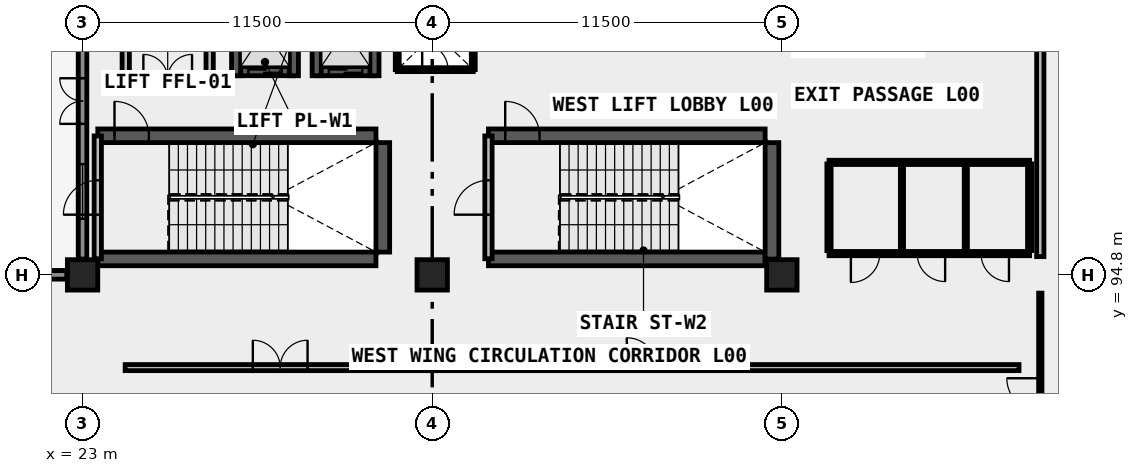
"""IFC4 building model, lengths in metres.
Left out: names, types, materials, properties, quantities, classifications, styles, units other than length and angle.
Written with IfcOpenShell. Run it as: python <this file> out.ifc"""

import sys

from ifc_helpers import new_model, si_unit, direction, frame, frame_2d, origin, origin_2d, place, context, subcontext, project, spatial, rectangle, extrude, element, fill, save


model = new_model("IFC4")
c1 = context("Model", 3, precision=1e-05, world=origin(), true_north=direction((0.0, 1.0)))
c2 = subcontext(c1, "Body", "Model", "MODEL_VIEW")
j1 = project(units=[si_unit("LENGTHUNIT", "METRE"), si_unit("PLANEANGLEUNIT", "RADIAN")], contexts=[c1])
p1 = place(None, origin())
s1 = spatial("IfcSite", under=j1, at=p1, CompositionType="ELEMENT")
p2 = place(p1, origin())
s2 = spatial("IfcBuilding", under=s1, at=p2, CompositionType="ELEMENT")
p3 = place(p2, origin())
s3 = spatial("IfcBuildingStorey", under=s2, at=p3, CompositionType="ELEMENT", Elevation=0.0)
for number, where, z_axis, x_axis in (
    (1, (23.0, 94.8, 0.0), (0.0, 0.0, 1.0), (1.0, 0.0, 0.0)),
    (2, (34.5, 94.8, 0.0), (0.0, 0.0, 1.0), (1.0, 0.0, 0.0)),
    (3, (46.0, 94.8, 0.0), (0.0, 0.0, 1.0), (1.0, 0.0, 0.0)),
):
    element("IfcColumn", number, at=place(p3, frame(where, z_axis=z_axis, x_axis=x_axis)), inside=s3, PredefinedType="COLUMN", context=c2, shape_type="SweptSolid", body=[
        extrude(rectangle(XDim=1.0, YDim=1.0, at=origin_2d()), origin(), (0.0, 0.0, 1.0), 4.2),
    ])
p4 = place(p3, frame((28.05, 101.5, 0.0), z_axis=(0.0, 0.0, 1.0), x_axis=(1.0, 0.0, 0.0)))
e4 = element("IfcWall", 4, at=p4, inside=s3, PredefinedType="SHEAR", context=c2, shape_type="SweptSolid", body=[
    extrude(rectangle(XDim=1.9, YDim=0.3, at=frame_2d((0.95, 0.0))), origin(), (0.0, 0.0, 1.0), 4.2),
])
p5 = place(p4, frame((0.4, 0.0, 0.0)))
e5 = element("IfcOpeningElement", 5, at=p5, cuts=e4, PredefinedType="OPENING", context=c2, shape_type="SweptSolid", body=[
    extrude(rectangle(XDim=1.1, YDim=2.15, at=frame_2d((0.55, 1.075))), frame((0.0, 0.16, 0.0), z_axis=(0.0, -1.0, 0.0), x_axis=(1.0, 0.0, 0.0)), (0.0, 0.0, 1.0), 0.32),
])
for number, where, z_axis, x_axis in (
    (6, (28.05, 101.35, 0.0), (0.0, 0.0, 1.0), (0.0, 1.0, 0.0)),
    (7, (29.95, 101.35, 0.0), (0.0, 0.0, 1.0), (0.0, 1.0, 0.0)),
):
    element("IfcWall", number, at=place(p3, frame(where, z_axis=z_axis, x_axis=x_axis)), inside=s3, PredefinedType="SHEAR", context=c2, shape_type="SweptSolid", body=[
        extrude(rectangle(XDim=3.0, YDim=0.3, at=frame_2d((1.5, 0.0))), origin(), (0.0, 0.0, 1.0), 4.2),
    ])
p6 = place(p3, frame((30.7, 101.5, 0.0), z_axis=(0.0, 0.0, 1.0), x_axis=(1.0, 0.0, 0.0)))
e8 = element("IfcWall", 8, at=p6, inside=s3, PredefinedType="SHEAR", context=c2, shape_type="SweptSolid", body=[
    extrude(rectangle(XDim=1.9, YDim=0.3, at=frame_2d((0.95, 0.0))), origin(), (0.0, 0.0, 1.0), 4.2),
])
p7 = place(p6, frame((0.4, 0.0, 0.0)))
e9 = element("IfcOpeningElement", 9, at=p7, cuts=e8, PredefinedType="OPENING", context=c2, shape_type="SweptSolid", body=[
    extrude(rectangle(XDim=1.1, YDim=2.15, at=frame_2d((0.55, 1.075))), frame((0.0, 0.16, 0.0), z_axis=(0.0, -1.0, 0.0), x_axis=(1.0, 0.0, 0.0)), (0.0, 0.0, 1.0), 0.32),
])
for number, where, z_axis, x_axis in (
    (10, (30.7, 101.35, 0.0), (0.0, 0.0, 1.0), (0.0, 1.0, 0.0)),
    (11, (32.6, 101.35, 0.0), (0.0, 0.0, 1.0), (0.0, 1.0, 0.0)),
):
    element("IfcWall", number, at=place(p3, frame(where, z_axis=z_axis, x_axis=x_axis)), inside=s3, PredefinedType="SHEAR", context=c2, shape_type="SweptSolid", body=[
        extrude(rectangle(XDim=3.0, YDim=0.3, at=frame_2d((1.5, 0.0))), origin(), (0.0, 0.0, 1.0), 4.2),
    ])
p8 = place(p3, frame((23.5, 95.325, 0.0), z_axis=(0.0, 0.0, 1.0), x_axis=(1.0, 0.0, 0.0)))
e12 = element("IfcWall", 12, at=p8, inside=s3, PredefinedType="SHEAR", context=c2, shape_type="SweptSolid", body=[
    extrude(rectangle(XDim=9.15, YDim=0.45, at=frame_2d((4.575, 0.0))), origin(), (0.0, 0.0, 1.0), 4.2),
])
p9 = place(p3, frame((23.5, 99.375, 0.0), z_axis=(0.0, 0.0, 1.0), x_axis=(1.0, 0.0, 0.0)))
e13 = element("IfcWall", 13, at=p9, inside=s3, PredefinedType="SHEAR", context=c2, shape_type="SweptSolid", body=[
    extrude(rectangle(XDim=9.15, YDim=0.45, at=frame_2d((4.575, 0.0))), origin(), (0.0, 0.0, 1.0), 4.2),
])
p10 = place(p9, frame((0.55, 0.0, 0.0)))
e14 = element("IfcOpeningElement", 14, at=p10, cuts=e13, PredefinedType="OPENING", context=c2, shape_type="SweptSolid", body=[
    extrude(rectangle(XDim=1.13, YDim=2.15, at=frame_2d((0.565, 1.075))), frame((0.0, 0.235, 0.0), z_axis=(0.0, -1.0, 0.0), x_axis=(1.0, 0.0, 0.0)), (0.0, 0.0, 1.0), 0.47),
])
p11 = place(p3, frame((32.875, 95.55, 0.0), z_axis=(0.0, 0.0, 1.0), x_axis=(0.0, 1.0, 0.0)))
e15 = element("IfcWall", 15, at=p11, inside=s3, PredefinedType="SHEAR", context=c2, shape_type="SweptSolid", body=[
    extrude(rectangle(XDim=3.6, YDim=0.45, at=frame_2d((1.8, 0.0))), origin(), (0.0, 0.0, 1.0), 4.2),
])
p12 = place(p3, frame((36.35, 95.325, 0.0), z_axis=(0.0, 0.0, 1.0), x_axis=(1.0, 0.0, 0.0)))
e16 = element("IfcWall", 16, at=p12, inside=s3, PredefinedType="SHEAR", context=c2, shape_type="SweptSolid", body=[
    extrude(rectangle(XDim=9.1, YDim=0.45, at=frame_2d((4.55, 0.0))), origin(), (0.0, 0.0, 1.0), 4.2),
])
p13 = place(p3, frame((36.35, 99.375, 0.0), z_axis=(0.0, 0.0, 1.0), x_axis=(1.0, 0.0, 0.0)))
e17 = element("IfcWall", 17, at=p13, inside=s3, PredefinedType="SHEAR", context=c2, shape_type="SweptSolid", body=[
    extrude(rectangle(XDim=9.1, YDim=0.45, at=frame_2d((4.55, 0.0))), origin(), (0.0, 0.0, 1.0), 4.2),
])
p14 = place(p13, frame((0.55, 0.0, 0.0)))
e18 = element("IfcOpeningElement", 18, at=p14, cuts=e17, PredefinedType="OPENING", context=c2, shape_type="SweptSolid", body=[
    extrude(rectangle(XDim=1.13, YDim=2.15, at=frame_2d((0.565, 1.075))), frame((0.0, 0.235, 0.0), z_axis=(0.0, -1.0, 0.0), x_axis=(1.0, 0.0, 0.0)), (0.0, 0.0, 1.0), 0.47),
])
p15 = place(p3, frame((45.675, 95.32, 0.0), z_axis=(0.0, 0.0, 1.0), x_axis=(0.0, 1.0, 0.0)))
e19 = element("IfcWall", 19, at=p15, inside=s3, PredefinedType="SHEAR", context=c2, shape_type="SweptSolid", body=[
    extrude(rectangle(XDim=3.83, YDim=0.45, at=frame_2d((1.915, 0.0))), origin(), (0.0, 0.0, 1.0), 4.2),
])
p16 = place(p3, frame((23.0, 95.32, 0.0), z_axis=(0.0, 0.0, 1.0), x_axis=(0.0, 1.0, 0.0)))
e20 = element("IfcWall", 20, at=p16, inside=s3, PredefinedType="SOLIDWALL", context=c2, shape_type="SweptSolid", body=[
    extrude(rectangle(XDim=8.96, YDim=0.28, at=frame_2d((4.48, 0.0))), origin(), (0.0, 0.0, 1.0), 3.15),
])
p17 = place(p16, frame((4.447, 0.0, 0.0)))
e21 = element("IfcOpeningElement", 21, at=p17, cuts=e20, PredefinedType="OPENING", context=c2, shape_type="SweptSolid", body=[
    extrude(rectangle(XDim=1.5, YDim=2.3, at=frame_2d((0.75, 1.15))), frame((0.0, 0.15, 0.0), z_axis=(0.0, -1.0, 0.0), x_axis=(1.0, 0.0, 0.0)), (0.0, 0.0, 1.0), 0.3),
])
p18 = place(p16, frame((1.323, 0.0, 0.78)))
e22 = element("IfcOpeningElement", 22, at=p18, cuts=e20, PredefinedType="OPENING", context=c2, shape_type="SweptSolid", body=[
    extrude(rectangle(XDim=1.8, YDim=1.95, at=frame_2d((0.9, 0.975))), frame((0.0, 0.15, 0.0), z_axis=(0.0, -1.0, 0.0), x_axis=(1.0, 0.0, 0.0)), (0.0, 0.0, 1.0), 0.3),
])
p19 = place(p3, frame((12.02, 94.8, 0.0), z_axis=(0.0, 0.0, 1.0), x_axis=(1.0, 0.0, 0.0)))
e23 = element("IfcWall", 23, at=p19, inside=s3, PredefinedType="SOLIDWALL", context=c2, shape_type="SweptSolid", body=[
    extrude(rectangle(XDim=10.46, YDim=0.28, at=frame_2d((5.23, 0.0))), origin(), (0.0, 0.0, 1.0), 3.15),
])
p20 = place(p19, frame((4.28, 0.0, 0.0)))
e24 = element("IfcOpeningElement", 24, at=p20, cuts=e23, PredefinedType="OPENING", context=c2, shape_type="SweptSolid", body=[
    extrude(rectangle(XDim=1.9, YDim=2.2, at=frame_2d((0.95, 1.1))), frame((0.0, 0.15, 0.0), z_axis=(0.0, -1.0, 0.0), x_axis=(1.0, 0.0, 0.0)), (0.0, 0.0, 1.0), 0.3),
])
p21 = place(p19, frame((1.24, 0.0, 0.78)))
e25 = element("IfcOpeningElement", 25, at=p21, cuts=e23, PredefinedType="OPENING", context=c2, shape_type="SweptSolid", body=[
    extrude(rectangle(XDim=1.8, YDim=1.95, at=frame_2d((0.9, 0.975))), frame((0.0, 0.15, 0.0), z_axis=(0.0, -1.0, 0.0), x_axis=(1.0, 0.0, 0.0)), (0.0, 0.0, 1.0), 0.3),
])
p22 = place(p3, frame((23.5, 95.33, 0.0), z_axis=(0.0, 0.0, 1.0), x_axis=(0.0, 1.0, 0.0)))
e26 = element("IfcWall", 26, at=p22, inside=s3, PredefinedType="SOLIDWALL", context=c2, shape_type="SweptSolid", body=[
    extrude(rectangle(XDim=4.04, YDim=0.24, at=frame_2d((2.02, 0.0))), origin(), (0.0, 0.0, 1.0), 3.88),
])
p23 = place(p22, frame((1.45, 0.0, 0.0)))
e27 = element("IfcOpeningElement", 27, at=p23, cuts=e26, PredefinedType="OPENING", context=c2, shape_type="SweptSolid", body=[
    extrude(rectangle(XDim=1.13, YDim=2.15, at=frame_2d((0.565, 1.075))), frame((0.0, 0.13, 0.0), z_axis=(0.0, -1.0, 0.0), x_axis=(1.0, 0.0, 0.0)), (0.0, 0.0, 1.0), 0.26),
])
p24 = place(p3, frame((36.35, 95.33, 0.0), z_axis=(0.0, 0.0, 1.0), x_axis=(0.0, 1.0, 0.0)))
e28 = element("IfcWall", 28, at=p24, inside=s3, PredefinedType="SOLIDWALL", context=c2, shape_type="SweptSolid", body=[
    extrude(rectangle(XDim=4.04, YDim=0.24, at=frame_2d((2.02, 0.0))), origin(), (0.0, 0.0, 1.0), 3.88),
])
p25 = place(p24, frame((1.45, 0.0, 0.0)))
e29 = element("IfcOpeningElement", 29, at=p25, cuts=e28, PredefinedType="OPENING", context=c2, shape_type="SweptSolid", body=[
    extrude(rectangle(XDim=1.13, YDim=2.15, at=frame_2d((0.565, 1.075))), frame((0.0, 0.13, 0.0), z_axis=(0.0, -1.0, 0.0), x_axis=(1.0, 0.0, 0.0)), (0.0, 0.0, 1.0), 0.26),
])
p26 = place(p3, frame((24.42, 101.25, 0.0), z_axis=(0.0, 0.0, 1.0), x_axis=(1.0, 0.0, 0.0)))
e30 = element("IfcWall", 30, at=p26, inside=s3, PredefinedType="SOLIDWALL", context=c2, shape_type="SweptSolid", body=[
    extrude(rectangle(XDim=2.76, YDim=0.24, at=frame_2d((1.38, 0.0))), origin(), (0.0, 0.0, 1.0), 3.88),
])
p27 = place(p26, frame((0.58, 0.0, 0.0)))
e31 = element("IfcOpeningElement", 31, at=p27, cuts=e30, PredefinedType="OPENING", context=c2, shape_type="SweptSolid", body=[
    extrude(rectangle(XDim=1.6, YDim=2.15, at=frame_2d((0.8, 1.075))), frame((0.0, 0.13, 0.0), z_axis=(0.0, -1.0, 0.0), x_axis=(1.0, 0.0, 0.0)), (0.0, 0.0, 1.0), 0.26),
])
for number, where, z_axis, x_axis in (
    (32, (24.42, 101.25, 0.0), (0.0, 0.0, 1.0), (0.0, 1.0, 0.0)),
    (33, (27.18, 101.25, 0.0), (0.0, 0.0, 1.0), (0.0, 1.0, 0.0)),
):
    element("IfcWall", number, at=place(p3, frame(where, z_axis=z_axis, x_axis=x_axis)), inside=s3, PredefinedType="SOLIDWALL", context=c2, shape_type="SweptSolid", body=[
        extrude(rectangle(XDim=2.6, YDim=0.24, at=frame_2d((1.3, 0.0))), origin(), (0.0, 0.0, 1.0), 3.88),
    ])
p28 = place(p3, frame((33.35, 101.55, 0.0), z_axis=(0.0, 0.0, 1.0), x_axis=(1.0, 0.0, 0.0)))
e34 = element("IfcWall", 34, at=p28, inside=s3, PredefinedType="PLUMBINGWALL", context=c2, shape_type="SweptSolid", body=[
    extrude(rectangle(XDim=2.5, YDim=0.13, at=frame_2d((1.25, 0.0))), origin(), (0.0, 0.0, 1.0), 3.88),
])
p29 = place(p28, frame((0.82, 0.0, 0.0)))
e35 = element("IfcOpeningElement", 35, at=p29, cuts=e34, PredefinedType="OPENING", context=c2, shape_type="SweptSolid", body=[
    extrude(rectangle(XDim=0.85, YDim=2.0, at=frame_2d((0.425, 1.0))), frame((0.0, 0.075, 0.0), z_axis=(0.0, -1.0, 0.0), x_axis=(1.0, 0.0, 0.0)), (0.0, 0.0, 1.0), 0.15),
])
for number, where, z_axis, x_axis in (
    (36, (33.35, 101.55, 0.0), (0.0, 0.0, 1.0), (0.0, 1.0, 0.0)),
    (37, (35.85, 101.55, 0.0), (0.0, 0.0, 1.0), (0.0, 1.0, 0.0)),
):
    element("IfcWall", number, at=place(p3, frame(where, z_axis=z_axis, x_axis=x_axis)), inside=s3, PredefinedType="PLUMBINGWALL", context=c2, shape_type="SweptSolid", body=[
        extrude(rectangle(XDim=2.4, YDim=0.13, at=frame_2d((1.2, 0.0))), origin(), (0.0, 0.0, 1.0), 3.88),
    ])
p30 = place(p3, frame((47.55, 95.5, 0.0), z_axis=(0.0, 0.0, 1.0), x_axis=(1.0, 0.0, 0.0)))
e38 = element("IfcWall", 38, at=p30, inside=s3, PredefinedType="PLUMBINGWALL", context=c2, shape_type="SweptSolid", body=[
    extrude(rectangle(XDim=6.6, YDim=0.14, at=frame_2d((3.3, 0.0))), origin(), (0.0, 0.0, 1.0), 3.88),
])
p31 = place(p30, frame((0.72, 0.0, 0.0)))
e39 = element("IfcOpeningElement", 39, at=p31, cuts=e38, PredefinedType="OPENING", context=c2, shape_type="SweptSolid", body=[
    extrude(rectangle(XDim=0.95, YDim=2.1, at=frame_2d((0.475, 1.05))), frame((0.0, 0.08, 0.0), z_axis=(0.0, -1.0, 0.0), x_axis=(1.0, 0.0, 0.0)), (0.0, 0.0, 1.0), 0.16),
])
p32 = place(p30, frame((2.9, 0.0, 0.0)))
e40 = element("IfcOpeningElement", 40, at=p32, cuts=e38, PredefinedType="OPENING", context=c2, shape_type="SweptSolid", body=[
    extrude(rectangle(XDim=0.92, YDim=2.1, at=frame_2d((0.46, 1.05))), frame((0.0, 0.08, 0.0), z_axis=(0.0, -1.0, 0.0), x_axis=(1.0, 0.0, 0.0)), (0.0, 0.0, 1.0), 0.16),
])
p33 = place(p30, frame((5.0, 0.0, 0.0)))
e41 = element("IfcOpeningElement", 41, at=p33, cuts=e38, PredefinedType="OPENING", context=c2, shape_type="SweptSolid", body=[
    extrude(rectangle(XDim=0.92, YDim=2.1, at=frame_2d((0.46, 1.05))), frame((0.0, 0.08, 0.0), z_axis=(0.0, -1.0, 0.0), x_axis=(1.0, 0.0, 0.0)), (0.0, 0.0, 1.0), 0.16),
])
p34 = place(p3, frame((47.55, 95.6, 0.0), z_axis=(0.0, 0.0, 1.0), x_axis=(0.0, 1.0, 0.0)))
e42 = element("IfcWall", 42, at=p34, inside=s3, PredefinedType="PLUMBINGWALL", context=c2, shape_type="SweptSolid", body=[
    extrude(rectangle(XDim=2.85, YDim=0.14, at=frame_2d((1.425, 0.0))), origin(), (0.0, 0.0, 1.0), 3.88),
])
p35 = place(p3, frame((49.95, 95.6, 0.0), z_axis=(0.0, 0.0, 1.0), x_axis=(0.0, 1.0, 0.0)))
e43 = element("IfcWall", 43, at=p35, inside=s3, PredefinedType="PARTITIONING", context=c2, shape_type="SweptSolid", body=[
    extrude(rectangle(XDim=2.85, YDim=0.105, at=frame_2d((1.425, 0.0))), origin(), (0.0, 0.0, 1.0), 3.4),
])
p36 = place(p3, frame((52.05, 95.6, 0.0), z_axis=(0.0, 0.0, 1.0), x_axis=(0.0, 1.0, 0.0)))
e44 = element("IfcWall", 44, at=p36, inside=s3, PredefinedType="PARTITIONING", context=c2, shape_type="SweptSolid", body=[
    extrude(rectangle(XDim=2.85, YDim=0.105, at=frame_2d((1.425, 0.0))), origin(), (0.0, 0.0, 1.0), 3.88),
])
p37 = place(p3, frame((54.15, 95.6, 0.0), z_axis=(0.0, 0.0, 1.0), x_axis=(0.0, 1.0, 0.0)))
e45 = element("IfcWall", 45, at=p37, inside=s3, PredefinedType="PLUMBINGWALL", context=c2, shape_type="SweptSolid", body=[
    extrude(rectangle(XDim=2.85, YDim=0.14, at=frame_2d((1.425, 0.0))), origin(), (0.0, 0.0, 1.0), 3.88),
])
p38 = place(p3, frame((47.55, 98.5, 0.0), z_axis=(0.0, 0.0, 1.0), x_axis=(1.0, 0.0, 0.0)))
e46 = element("IfcWall", 46, at=p38, inside=s3, PredefinedType="PLUMBINGWALL", context=c2, shape_type="SweptSolid", body=[
    extrude(rectangle(XDim=6.6, YDim=0.14, at=frame_2d((3.3, 0.0))), origin(), (0.0, 0.0, 1.0), 3.88),
])
p39 = place(p3, frame((24.4, 91.75, 0.0), z_axis=(0.0, 0.0, 1.0), x_axis=(1.0, 0.0, 0.0)))
e47 = element("IfcWall", 47, at=p39, inside=s3, PredefinedType="PARTITIONING", context=c2, shape_type="SweptSolid", body=[
    extrude(rectangle(XDim=29.4, YDim=0.2, at=frame_2d((14.7, 0.0))), origin(), (0.0, 0.0, 1.0), 3.88),
])
p40 = place(p39, frame((4.2, 0.0, 0.0)))
e48 = element("IfcOpeningElement", 48, at=p40, cuts=e47, PredefinedType="OPENING", context=c2, shape_type="SweptSolid", body=[
    extrude(rectangle(XDim=1.8, YDim=2.2, at=frame_2d((0.9, 1.1))), frame((0.0, 0.11, 0.0), z_axis=(0.0, -1.0, 0.0), x_axis=(1.0, 0.0, 0.0)), (0.0, 0.0, 1.0), 0.22),
])
p41 = place(p39, frame((16.5, 0.0, 0.0)))
e49 = element("IfcOpeningElement", 49, at=p41, cuts=e47, PredefinedType="OPENING", context=c2, shape_type="SweptSolid", body=[
    extrude(rectangle(XDim=0.98, YDim=2.15, at=frame_2d((0.49, 1.075))), frame((0.0, 0.11, 0.0), z_axis=(0.0, -1.0, 0.0), x_axis=(1.0, 0.0, 0.0)), (0.0, 0.0, 1.0), 0.22),
])
p42 = place(p3, frame((54.5, 86.4, 0.0), z_axis=(0.0, 0.0, 1.0), x_axis=(0.0, 1.0, 0.0)))
e50 = element("IfcWall", 50, at=p42, inside=s3, PredefinedType="MOVABLE", context=c2, shape_type="SweptSolid", body=[
    extrude(rectangle(XDim=7.8, YDim=0.11, at=frame_2d((3.9, 0.0))), origin(), (0.0, 0.0, 1.0), 3.88),
])
p43 = place(p42, frame((2.8, 0.0, 0.0)))
e51 = element("IfcOpeningElement", 51, at=p43, cuts=e50, PredefinedType="OPENING", context=c2, shape_type="SweptSolid", body=[
    extrude(rectangle(XDim=2.2, YDim=2.4, at=frame_2d((1.1, 1.2))), frame((0.0, 0.065, 0.0), z_axis=(0.0, -1.0, 0.0), x_axis=(1.0, 0.0, 0.0)), (0.0, 0.0, 1.0), 0.13),
])
p44 = place(p3, frame((54.5, 95.4, 0.0), z_axis=(0.0, 0.0, 1.0), x_axis=(0.0, 1.0, 0.0)))
e52 = element("IfcWall", 52, at=p44, inside=s3, PredefinedType="SOLIDWALL", context=c2, shape_type="SweptSolid", body=[
    extrude(rectangle(XDim=9.12, YDim=0.24, at=frame_2d((4.56, 0.0))), origin(), (0.0, 0.0, 1.0), 3.88),
])
p45 = place(p17, origin())
e53 = element("IfcDoor", 53, at=p45, inside=s3, OperationType="DOUBLE_DOOR_SINGLE_SWING", PredefinedType="DOOR", context=c2, shape_type="SweptSolid", body=[
    extrude(rectangle(XDim=1.5, YDim=2.3, at=frame_2d((0.75, 1.15))), frame((0.0, 0.025, 0.0), z_axis=(0.0, -1.0, 0.0), x_axis=(1.0, 0.0, 0.0)), (0.0, 0.0, 1.0), 0.05),
])
fill(e21, e53)
p46 = place(p18, origin())
e54 = element("IfcWindow", 54, at=p46, inside=s3, PartitioningType="SINGLE_PANEL", PredefinedType="WINDOW", context=c2, shape_type="SweptSolid", body=[
    extrude(rectangle(XDim=1.8, YDim=1.95, at=frame_2d((0.9, 0.975))), frame((0.0, 0.03, 0.0), z_axis=(0.0, -1.0, 0.0), x_axis=(1.0, 0.0, 0.0)), (0.0, 0.0, 1.0), 0.06),
])
fill(e22, e54)
p47 = place(p5, origin())
e55 = element("IfcDoor", 55, at=p47, inside=s3, OperationType="SLIDING_TO_LEFT", PredefinedType="DOOR", context=c2, shape_type="SweptSolid", body=[
    extrude(rectangle(XDim=1.1, YDim=2.15, at=frame_2d((0.55, 1.075))), frame((0.0, 0.025, 0.0), z_axis=(0.0, -1.0, 0.0), x_axis=(1.0, 0.0, 0.0)), (0.0, 0.0, 1.0), 0.05),
])
fill(e5, e55)
p48 = place(p7, origin())
e56 = element("IfcDoor", 56, at=p48, inside=s3, OperationType="SLIDING_TO_LEFT", PredefinedType="DOOR", context=c2, shape_type="SweptSolid", body=[
    extrude(rectangle(XDim=1.1, YDim=2.15, at=frame_2d((0.55, 1.075))), frame((0.0, 0.025, 0.0), z_axis=(0.0, -1.0, 0.0), x_axis=(1.0, 0.0, 0.0)), (0.0, 0.0, 1.0), 0.05),
])
fill(e9, e56)
p49 = place(p23, origin())
e57 = element("IfcDoor", 57, at=p49, inside=s3, OperationType="SINGLE_SWING_LEFT", PredefinedType="DOOR", context=c2, shape_type="SweptSolid", body=[
    extrude(rectangle(XDim=1.13, YDim=2.15, at=frame_2d((0.565, 1.075))), frame((0.0, 0.025, 0.0), z_axis=(0.0, -1.0, 0.0), x_axis=(1.0, 0.0, 0.0)), (0.0, 0.0, 1.0), 0.05),
])
fill(e27, e57)
p50 = place(p10, origin())
e58 = element("IfcDoor", 58, at=p50, inside=s3, OperationType="SINGLE_SWING_LEFT", PredefinedType="DOOR", context=c2, shape_type="SweptSolid", body=[
    extrude(rectangle(XDim=1.13, YDim=2.15, at=frame_2d((0.565, 1.075))), frame((0.0, 0.025, 0.0), z_axis=(0.0, -1.0, 0.0), x_axis=(1.0, 0.0, 0.0)), (0.0, 0.0, 1.0), 0.05),
])
fill(e14, e58)
p51 = place(p25, origin())
e59 = element("IfcDoor", 59, at=p51, inside=s3, OperationType="SINGLE_SWING_LEFT", PredefinedType="DOOR", context=c2, shape_type="SweptSolid", body=[
    extrude(rectangle(XDim=1.13, YDim=2.15, at=frame_2d((0.565, 1.075))), frame((0.0, 0.025, 0.0), z_axis=(0.0, -1.0, 0.0), x_axis=(1.0, 0.0, 0.0)), (0.0, 0.0, 1.0), 0.05),
])
fill(e29, e59)
p52 = place(p14, origin())
e60 = element("IfcDoor", 60, at=p52, inside=s3, OperationType="SINGLE_SWING_LEFT", PredefinedType="DOOR", context=c2, shape_type="SweptSolid", body=[
    extrude(rectangle(XDim=1.13, YDim=2.15, at=frame_2d((0.565, 1.075))), frame((0.0, 0.025, 0.0), z_axis=(0.0, -1.0, 0.0), x_axis=(1.0, 0.0, 0.0)), (0.0, 0.0, 1.0), 0.05),
])
fill(e18, e60)
p53 = place(p27, origin())
e61 = element("IfcDoor", 61, at=p53, inside=s3, OperationType="DOUBLE_DOOR_SINGLE_SWING", PredefinedType="DOOR", context=c2, shape_type="SweptSolid", body=[
    extrude(rectangle(XDim=1.6, YDim=2.15, at=frame_2d((0.8, 1.075))), frame((0.0, 0.025, 0.0), z_axis=(0.0, -1.0, 0.0), x_axis=(1.0, 0.0, 0.0)), (0.0, 0.0, 1.0), 0.05),
])
fill(e31, e61)
p54 = place(p29, origin())
e62 = element("IfcDoor", 62, at=p54, inside=s3, OperationType="SINGLE_SWING_LEFT", PredefinedType="TRAPDOOR", context=c2, shape_type="SweptSolid", body=[
    extrude(rectangle(XDim=0.85, YDim=2.0, at=frame_2d((0.425, 1.0))), frame((0.0, 0.025, 0.0), z_axis=(0.0, -1.0, 0.0), x_axis=(1.0, 0.0, 0.0)), (0.0, 0.0, 1.0), 0.05),
])
fill(e35, e62)
p55 = place(p31, frame((0.475, 0.0, 0.0), z_axis=(0.0, 0.0, 1.0), x_axis=(-1.0, 0.0, 0.0)))
e63 = element("IfcDoor", 63, at=p55, inside=s3, OperationType="SINGLE_SWING_LEFT", PredefinedType="DOOR", context=c2, shape_type="SweptSolid", body=[
    extrude(rectangle(XDim=0.95, YDim=2.1, at=frame_2d((0.0, 1.05))), frame((0.0, 0.025, 0.0), z_axis=(0.0, -1.0, 0.0), x_axis=(1.0, 0.0, 0.0)), (0.0, 0.0, 1.0), 0.05),
])
fill(e39, e63)
p56 = place(p32, origin())
e64 = element("IfcDoor", 64, at=p56, inside=s3, OperationType="SINGLE_SWING_RIGHT", PredefinedType="DOOR", context=c2, shape_type="SweptSolid", body=[
    extrude(rectangle(XDim=0.92, YDim=2.1, at=frame_2d((0.46, 1.05))), frame((0.0, 0.025, 0.0), z_axis=(0.0, -1.0, 0.0), x_axis=(1.0, 0.0, 0.0)), (0.0, 0.0, 1.0), 0.05),
])
fill(e40, e64)
p57 = place(p33, origin())
e65 = element("IfcDoor", 65, at=p57, inside=s3, OperationType="SINGLE_SWING_RIGHT", PredefinedType="DOOR", context=c2, shape_type="SweptSolid", body=[
    extrude(rectangle(XDim=0.92, YDim=2.1, at=frame_2d((0.46, 1.05))), frame((0.0, 0.025, 0.0), z_axis=(0.0, -1.0, 0.0), x_axis=(1.0, 0.0, 0.0)), (0.0, 0.0, 1.0), 0.05),
])
fill(e41, e65)
p58 = place(p40, origin())
e66 = element("IfcDoor", 66, at=p58, inside=s3, OperationType="DOUBLE_DOOR_SINGLE_SWING", PredefinedType="DOOR", context=c2, shape_type="SweptSolid", body=[
    extrude(rectangle(XDim=1.8, YDim=2.2, at=frame_2d((0.9, 1.1))), frame((0.0, 0.025, 0.0), z_axis=(0.0, -1.0, 0.0), x_axis=(1.0, 0.0, 0.0)), (0.0, 0.0, 1.0), 0.05),
])
fill(e48, e66)
p59 = place(p41, origin())
e67 = element("IfcDoor", 67, at=p59, inside=s3, OperationType="SINGLE_SWING_LEFT", PredefinedType="DOOR", context=c2, shape_type="SweptSolid", body=[
    extrude(rectangle(XDim=0.98, YDim=2.15, at=frame_2d((0.49, 1.075))), frame((0.0, 0.025, 0.0), z_axis=(0.0, -1.0, 0.0), x_axis=(1.0, 0.0, 0.0)), (0.0, 0.0, 1.0), 0.05),
])
fill(e49, e67)
p60 = place(p43, origin())
e68 = element("IfcDoor", 68, at=p60, inside=s3, OperationType="DOUBLE_DOOR_SINGLE_SWING", PredefinedType="DOOR", context=c2, shape_type="SweptSolid", body=[
    extrude(rectangle(XDim=2.2, YDim=2.4, at=frame_2d((1.1, 1.2))), frame((0.0, 0.025, 0.0), z_axis=(0.0, -1.0, 0.0), x_axis=(1.0, 0.0, 0.0)), (0.0, 0.0, 1.0), 0.05),
])
fill(e51, e68)
save(model, sys.argv[1])
